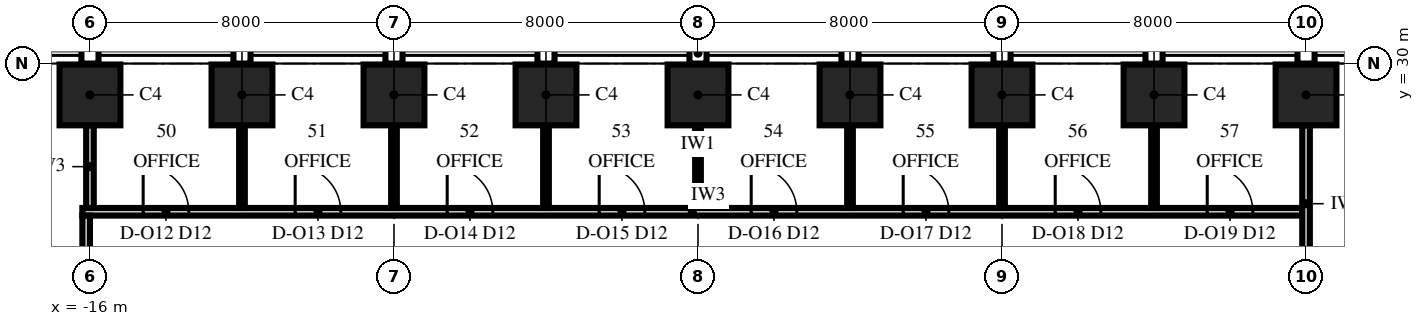
"""IFC4 building model, lengths in metres.
Left out: names, types, materials, properties, quantities, classifications, styles, units other than length and angle.
Written with IfcOpenShell. Run it as: python <this file> out.ifc"""

import sys

from ifc_helpers import new_model, si_unit, direction, frame, frame_2d, origin, origin_2d, place, context, subcontext, project, spatial, rectangle, extrude, element, fill, save


model = new_model("IFC4")
c1 = context("Model", 3, precision=1e-05, world=origin(), true_north=direction((0.0, 1.0)))
c2 = subcontext(c1, "Body", "Model", "MODEL_VIEW")
j1 = project(units=[si_unit("LENGTHUNIT", "METRE"), si_unit("PLANEANGLEUNIT", "RADIAN")], contexts=[c1])
p1 = place(None, origin())
s1 = spatial("IfcSite", under=j1, at=p1, CompositionType="ELEMENT")
p2 = place(p1, origin())
s2 = spatial("IfcBuilding", under=s1, at=p2, CompositionType="ELEMENT")
p3 = place(p2, frame((0.0, 0.0, 202.0)))
s3 = spatial("IfcBuildingStorey", under=s2, at=p3, CompositionType="ELEMENT", Elevation=202.0)
for number, where, z_axis, x_axis in (
    (1, (16.0, 29.175, 0.0), (0.0, 0.0, 1.0), (-1.0, 0.0, 0.0)),
    (2, (12.0, 29.175, 0.0), (0.0, 0.0, 1.0), (-1.0, 0.0, 0.0)),
    (3, (8.0, 29.175, 0.0), (0.0, 0.0, 1.0), (-1.0, 0.0, 0.0)),
    (4, (4.0, 29.175, 0.0), (0.0, 0.0, 1.0), (-1.0, 0.0, 0.0)),
    (5, (0.0, 29.175, 0.0), (0.0, 0.0, 1.0), (-1.0, 0.0, 0.0)),
    (6, (-4.0, 29.175, 0.0), (0.0, 0.0, 1.0), (-1.0, 0.0, 0.0)),
    (7, (-8.0, 29.175, 0.0), (0.0, 0.0, 1.0), (-1.0, 0.0, 0.0)),
    (8, (-12.0, 29.175, 0.0), (0.0, 0.0, 1.0), (-1.0, 0.0, 0.0)),
    (9, (-16.0, 29.175, 0.0), (0.0, 0.0, 1.0), (-1.0, 0.0, 0.0)),
):
    element("IfcColumn", number, at=place(p3, frame(where, z_axis=z_axis, x_axis=x_axis)), inside=s3, PredefinedType="COLUMN", context=c2, shape_type="SweptSolid", body=[
        extrude(rectangle(XDim=1.6, YDim=1.6, at=origin_2d()), origin(), (0.0, 0.0, 1.0), 4.0),
    ])
p4 = place(p3, frame((-16.2, 26.1, 0.0), z_axis=(0.0, 0.0, 1.0), x_axis=(1.0, 0.0, 0.0)))
e10 = element("IfcWall", 10, at=p4, inside=s3, PredefinedType="PARTITIONING", context=c2, shape_type="SweptSolid", body=[
    extrude(rectangle(XDim=32.1, YDim=0.2, at=frame_2d((16.05, 0.0))), origin(), (0.0, 0.0, 1.0), 3.4),
])
p5 = place(p4, frame((1.6, 0.0, 0.0)))
e11 = element("IfcOpeningElement", 11, at=p5, cuts=e10, PredefinedType="OPENING", context=c2, shape_type="SweptSolid", body=[
    extrude(rectangle(XDim=1.2, YDim=2.4, at=frame_2d((0.6, 1.2))), frame((0.0, 0.115, 0.0), z_axis=(0.0, -1.0, 0.0), x_axis=(1.0, 0.0, 0.0)), (0.0, 0.0, 1.0), 0.23),
])
p6 = place(p4, frame((5.6, 0.0, 0.0)))
e12 = element("IfcOpeningElement", 12, at=p6, cuts=e10, PredefinedType="OPENING", context=c2, shape_type="SweptSolid", body=[
    extrude(rectangle(XDim=1.2, YDim=2.4, at=frame_2d((0.6, 1.2))), frame((0.0, 0.115, 0.0), z_axis=(0.0, -1.0, 0.0), x_axis=(1.0, 0.0, 0.0)), (0.0, 0.0, 1.0), 0.23),
])
p7 = place(p4, frame((9.6, 0.0, 0.0)))
e13 = element("IfcOpeningElement", 13, at=p7, cuts=e10, PredefinedType="OPENING", context=c2, shape_type="SweptSolid", body=[
    extrude(rectangle(XDim=1.2, YDim=2.4, at=frame_2d((0.6, 1.2))), frame((0.0, 0.115, 0.0), z_axis=(0.0, -1.0, 0.0), x_axis=(1.0, 0.0, 0.0)), (0.0, 0.0, 1.0), 0.23),
])
p8 = place(p4, frame((13.6, 0.0, 0.0)))
e14 = element("IfcOpeningElement", 14, at=p8, cuts=e10, PredefinedType="OPENING", context=c2, shape_type="SweptSolid", body=[
    extrude(rectangle(XDim=1.2, YDim=2.4, at=frame_2d((0.6, 1.2))), frame((0.0, 0.115, 0.0), z_axis=(0.0, -1.0, 0.0), x_axis=(1.0, 0.0, 0.0)), (0.0, 0.0, 1.0), 0.23),
])
p9 = place(p4, frame((17.6, 0.0, 0.0)))
e15 = element("IfcOpeningElement", 15, at=p9, cuts=e10, PredefinedType="OPENING", context=c2, shape_type="SweptSolid", body=[
    extrude(rectangle(XDim=1.2, YDim=2.4, at=frame_2d((0.6, 1.2))), frame((0.0, 0.115, 0.0), z_axis=(0.0, -1.0, 0.0), x_axis=(1.0, 0.0, 0.0)), (0.0, 0.0, 1.0), 0.23),
])
p10 = place(p4, frame((21.6, 0.0, 0.0)))
e16 = element("IfcOpeningElement", 16, at=p10, cuts=e10, PredefinedType="OPENING", context=c2, shape_type="SweptSolid", body=[
    extrude(rectangle(XDim=1.2, YDim=2.4, at=frame_2d((0.6, 1.2))), frame((0.0, 0.115, 0.0), z_axis=(0.0, -1.0, 0.0), x_axis=(1.0, 0.0, 0.0)), (0.0, 0.0, 1.0), 0.23),
])
p11 = place(p4, frame((25.6, 0.0, 0.0)))
e17 = element("IfcOpeningElement", 17, at=p11, cuts=e10, PredefinedType="OPENING", context=c2, shape_type="SweptSolid", body=[
    extrude(rectangle(XDim=1.2, YDim=2.4, at=frame_2d((0.6, 1.2))), frame((0.0, 0.115, 0.0), z_axis=(0.0, -1.0, 0.0), x_axis=(1.0, 0.0, 0.0)), (0.0, 0.0, 1.0), 0.23),
])
p12 = place(p4, frame((29.6, 0.0, 0.0)))
e18 = element("IfcOpeningElement", 18, at=p12, cuts=e10, PredefinedType="OPENING", context=c2, shape_type="SweptSolid", body=[
    extrude(rectangle(XDim=1.2, YDim=2.4, at=frame_2d((0.6, 1.2))), frame((0.0, 0.115, 0.0), z_axis=(0.0, -1.0, 0.0), x_axis=(1.0, 0.0, 0.0)), (0.0, 0.0, 1.0), 0.23),
])
p13 = place(p3, frame((-16.1, 9.9, 0.0), z_axis=(0.0, 0.0, 1.0), x_axis=(0.0, 1.0, 0.0)))
e19 = element("IfcWall", 19, at=p13, inside=s3, PredefinedType="PARTITIONING", context=c2, shape_type="SweptSolid", body=[
    extrude(rectangle(XDim=16.1, YDim=0.2, at=frame_2d((8.05, 0.0))), origin(), (0.0, 0.0, 1.0), 3.25),
])
p14 = place(p13, frame((7.88, 0.0, 0.0)))
e20 = element("IfcOpeningElement", 20, at=p14, cuts=e19, PredefinedType="OPENING", context=c2, shape_type="SweptSolid", body=[
    extrude(rectangle(XDim=1.2, YDim=2.4, at=frame_2d((0.6, 1.2))), frame((0.0, 0.115, 0.0), z_axis=(0.0, -1.0, 0.0), x_axis=(1.0, 0.0, 0.0)), (0.0, 0.0, 1.0), 0.23),
])
p15 = place(p3, frame((-16.0, 26.2, 0.0), z_axis=(0.0, 0.0, 1.0), x_axis=(0.0, 1.0, 0.0)))
e21 = element("IfcWall", 21, at=p15, inside=s3, PredefinedType="PARTITIONING", context=c2, shape_type="SweptSolid", body=[
    extrude(rectangle(XDim=2.175, YDim=0.2, at=frame_2d((1.087, 0.0))), origin(), (0.0, 0.0, 1.0), 3.4),
])
for number, where, z_axis, x_axis in (
    (22, (-12.0, 26.2, 0.0), (0.0, 0.0, 1.0), (0.0, 1.0, 0.0)),
    (23, (-8.0, 26.2, 0.0), (0.0, 0.0, 1.0), (0.0, 1.0, 0.0)),
):
    element("IfcWall", number, at=place(p3, frame(where, z_axis=z_axis, x_axis=x_axis)), inside=s3, PredefinedType="PARTITIONING", context=c2, shape_type="SweptSolid", body=[
        extrude(rectangle(XDim=2.175, YDim=0.15, at=frame_2d((1.087, 0.0))), origin(), (0.0, 0.0, 1.0), 3.4),
    ])
p16 = place(p3, frame((-4.0, 26.2, 0.0), z_axis=(0.0, 0.0, 1.0), x_axis=(0.0, 1.0, 0.0)))
e24 = element("IfcWall", 24, at=p16, inside=s3, PredefinedType="PARTITIONING", context=c2, shape_type="SweptSolid", body=[
    extrude(rectangle(XDim=2.175, YDim=0.15, at=frame_2d((1.087, 0.0))), origin(), (0.0, 0.0, 1.0), 3.85),
])
p17 = place(p3, frame((0.0, 26.2, 0.0), z_axis=(0.0, 0.0, 1.0), x_axis=(0.0, 1.0, 0.0)))
e25 = element("IfcWall", 25, at=p17, inside=s3, PredefinedType="PARTITIONING", context=c2, shape_type="SweptSolid", body=[
    extrude(rectangle(XDim=2.175, YDim=0.15, at=frame_2d((1.087, 0.0))), origin(), (0.0, 0.0, 1.0), 3.4),
])
p18 = place(p3, frame((4.0, 26.2, 0.0), z_axis=(0.0, 0.0, 1.0), x_axis=(0.0, 1.0, 0.0)))
e26 = element("IfcWall", 26, at=p18, inside=s3, PredefinedType="PARTITIONING", context=c2, shape_type="SweptSolid", body=[
    extrude(rectangle(XDim=2.175, YDim=0.15, at=frame_2d((1.087, 0.0))), origin(), (0.0, 0.0, 1.0), 3.85),
])
for number, where, z_axis, x_axis in (
    (27, (8.0, 26.2, 0.0), (0.0, 0.0, 1.0), (0.0, 1.0, 0.0)),
    (28, (12.0, 26.2, 0.0), (0.0, 0.0, 1.0), (0.0, 1.0, 0.0)),
):
    element("IfcWall", number, at=place(p3, frame(where, z_axis=z_axis, x_axis=x_axis)), inside=s3, PredefinedType="PARTITIONING", context=c2, shape_type="SweptSolid", body=[
        extrude(rectangle(XDim=2.175, YDim=0.15, at=frame_2d((1.087, 0.0))), origin(), (0.0, 0.0, 1.0), 3.4),
    ])
p19 = place(p3, frame((16.0, 24.25, 0.0), z_axis=(0.0, 0.0, 1.0), x_axis=(0.0, 1.0, 0.0)))
e29 = element("IfcWall", 29, at=p19, inside=s3, PredefinedType="PARTITIONING", context=c2, shape_type="SweptSolid", body=[
    extrude(rectangle(XDim=4.125, YDim=0.2, at=frame_2d((2.062, 0.0))), origin(), (0.0, 0.0, 1.0), 3.4),
])
p20 = place(p5, origin())
e30 = element("IfcDoor", 30, at=p20, inside=s3, OperationType="SINGLE_SWING_LEFT", PredefinedType="DOOR", context=c2, shape_type="SweptSolid", body=[
    extrude(rectangle(XDim=1.2, YDim=2.4, at=frame_2d((0.6, 1.2))), frame((0.0, 0.1, 0.0), z_axis=(0.0, -1.0, 0.0), x_axis=(1.0, 0.0, 0.0)), (0.0, 0.0, 1.0), 0.199),
])
fill(e11, e30)
p21 = place(p6, origin())
e31 = element("IfcDoor", 31, at=p21, inside=s3, OperationType="SINGLE_SWING_LEFT", PredefinedType="DOOR", context=c2, shape_type="SweptSolid", body=[
    extrude(rectangle(XDim=1.2, YDim=2.4, at=frame_2d((0.6, 1.2))), frame((0.0, 0.1, 0.0), z_axis=(0.0, -1.0, 0.0), x_axis=(1.0, 0.0, 0.0)), (0.0, 0.0, 1.0), 0.199),
])
fill(e12, e31)
p22 = place(p7, origin())
e32 = element("IfcDoor", 32, at=p22, inside=s3, OperationType="SINGLE_SWING_LEFT", PredefinedType="DOOR", context=c2, shape_type="SweptSolid", body=[
    extrude(rectangle(XDim=1.2, YDim=2.4, at=frame_2d((0.6, 1.2))), frame((0.0, 0.1, 0.0), z_axis=(0.0, -1.0, 0.0), x_axis=(1.0, 0.0, 0.0)), (0.0, 0.0, 1.0), 0.199),
])
fill(e13, e32)
p23 = place(p8, origin())
e33 = element("IfcDoor", 33, at=p23, inside=s3, OperationType="SINGLE_SWING_LEFT", PredefinedType="DOOR", context=c2, shape_type="SweptSolid", body=[
    extrude(rectangle(XDim=1.2, YDim=2.4, at=frame_2d((0.6, 1.2))), frame((0.0, 0.1, 0.0), z_axis=(0.0, -1.0, 0.0), x_axis=(1.0, 0.0, 0.0)), (0.0, 0.0, 1.0), 0.199),
])
fill(e14, e33)
p24 = place(p9, origin())
e34 = element("IfcDoor", 34, at=p24, inside=s3, OperationType="SINGLE_SWING_LEFT", PredefinedType="DOOR", context=c2, shape_type="SweptSolid", body=[
    extrude(rectangle(XDim=1.2, YDim=2.4, at=frame_2d((0.6, 1.2))), frame((0.0, 0.1, 0.0), z_axis=(0.0, -1.0, 0.0), x_axis=(1.0, 0.0, 0.0)), (0.0, 0.0, 1.0), 0.199),
])
fill(e15, e34)
p25 = place(p10, origin())
e35 = element("IfcDoor", 35, at=p25, inside=s3, OperationType="SINGLE_SWING_LEFT", PredefinedType="DOOR", context=c2, shape_type="SweptSolid", body=[
    extrude(rectangle(XDim=1.2, YDim=2.4, at=frame_2d((0.6, 1.2))), frame((0.0, 0.1, 0.0), z_axis=(0.0, -1.0, 0.0), x_axis=(1.0, 0.0, 0.0)), (0.0, 0.0, 1.0), 0.199),
])
fill(e16, e35)
p26 = place(p11, origin())
e36 = element("IfcDoor", 36, at=p26, inside=s3, OperationType="SINGLE_SWING_LEFT", PredefinedType="DOOR", context=c2, shape_type="SweptSolid", body=[
    extrude(rectangle(XDim=1.2, YDim=2.4, at=frame_2d((0.6, 1.2))), frame((0.0, 0.1, 0.0), z_axis=(0.0, -1.0, 0.0), x_axis=(1.0, 0.0, 0.0)), (0.0, 0.0, 1.0), 0.199),
])
fill(e17, e36)
p27 = place(p12, origin())
e37 = element("IfcDoor", 37, at=p27, inside=s3, OperationType="SINGLE_SWING_LEFT", PredefinedType="DOOR", context=c2, shape_type="SweptSolid", body=[
    extrude(rectangle(XDim=1.2, YDim=2.4, at=frame_2d((0.6, 1.2))), frame((0.0, 0.1, 0.0), z_axis=(0.0, -1.0, 0.0), x_axis=(1.0, 0.0, 0.0)), (0.0, 0.0, 1.0), 0.199),
])
fill(e18, e37)
save(model, sys.argv[1])
